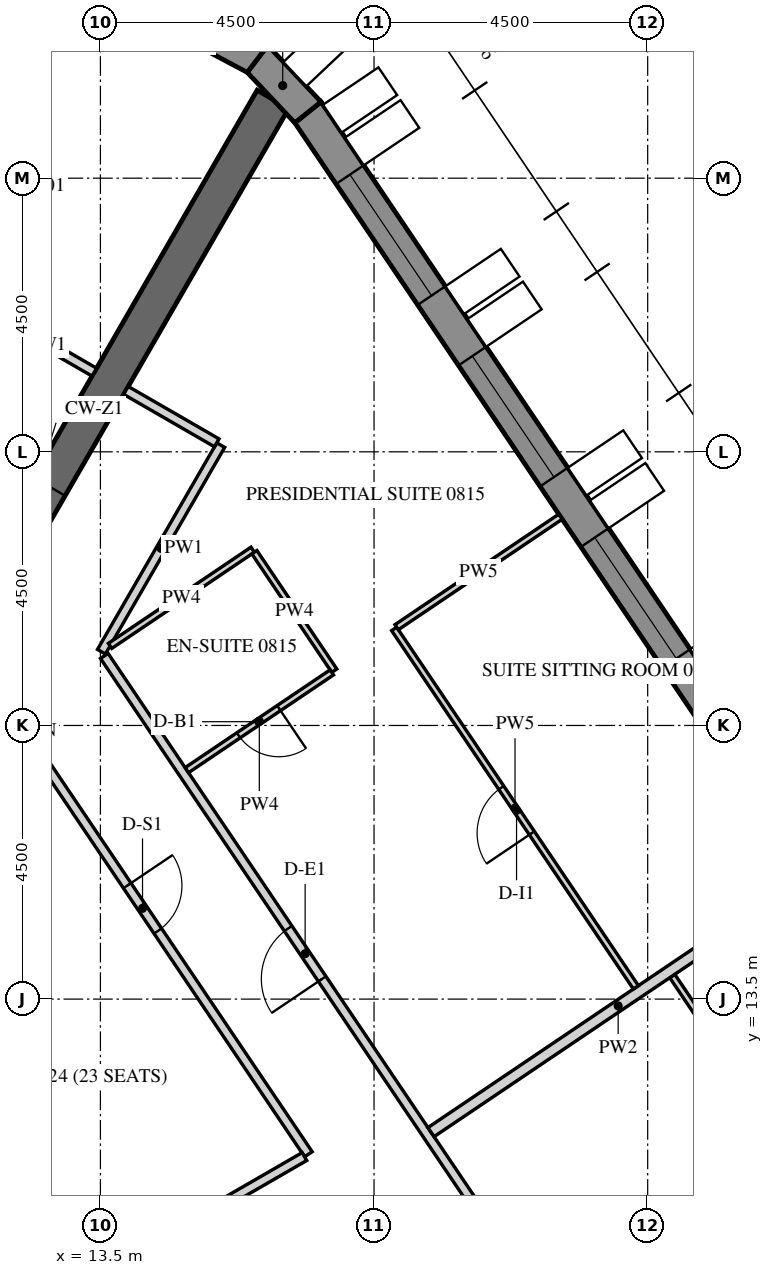
"""IFC4 building model, lengths in metres.
Left out: names, types, materials, properties, quantities, classifications, styles, units other than length and angle.
Written with IfcOpenShell. Run it as: python <this file> out.ifc"""

import sys

from ifc_helpers import new_model, si_unit, direction, frame, frame_2d, origin, place, context, subcontext, project, spatial, polyline, rectangle, outline, extrude, element, fill, save


model = new_model("IFC4")
c1 = context("Model", 3, precision=1e-05, world=origin(), true_north=direction((0.0, 1.0)))
c2 = subcontext(c1, "Body", "Model", "MODEL_VIEW")
j1 = project(units=[si_unit("LENGTHUNIT", "METRE"), si_unit("PLANEANGLEUNIT", "RADIAN")], contexts=[c1])
p1 = place(None, origin())
s1 = spatial("IfcSite", under=j1, at=p1, CompositionType="ELEMENT")
p2 = place(p1, origin())
s2 = spatial("IfcBuilding", under=s1, at=p2, CompositionType="ELEMENT")
p3 = place(p2, frame((0.0, 0.0, 111.6)))
s3 = spatial("IfcBuildingStorey", under=s2, at=p3, CompositionType="ELEMENT", Elevation=111.6)
p4 = place(p3, frame((33.728, 3.153, -0.15), z_axis=(0.0, 0.0, 1.0), x_axis=(-0.559192411416, 0.82903790445, 0.0)))
e1 = element("IfcWall", 1, at=p4, inside=s3, PredefinedType="SOLIDWALL", context=c2, shape_type="SweptSolid", body=[
    extrude(outline(polyline([(-0.026, -0.275), (30.093, -0.275), (30.048, 0.275), (0.026, 0.275), (-0.026, -0.275)])), origin(), (0.0, 0.0, 1.0), 3.9),
])
p5 = place(p4, frame((1.236, 0.0, 1.05)))
e2 = element("IfcOpeningElement", 2, at=p5, cuts=e1, PredefinedType="OPENING", context=c2, shape_type="SweptSolid", body=[
    extrude(rectangle(XDim=2.4, YDim=2.4, at=frame_2d((1.2, 1.2))), frame((0.0, 0.285, 0.0), z_axis=(0.0, -1.0, 0.0), x_axis=(1.0, 0.0, 0.0)), (0.0, 0.0, 1.0), 0.57),
])
p6 = place(p4, frame((4.835, 0.0, 1.05)))
e3 = element("IfcOpeningElement", 3, at=p6, cuts=e1, PredefinedType="OPENING", context=c2, shape_type="SweptSolid", body=[
    extrude(rectangle(XDim=2.4, YDim=2.4, at=frame_2d((1.2, 1.2))), frame((0.0, 0.285, 0.0), z_axis=(0.0, -1.0, 0.0), x_axis=(1.0, 0.0, 0.0)), (0.0, 0.0, 1.0), 0.57),
])
p7 = place(p4, frame((8.436, 0.0, 1.05)))
e4 = element("IfcOpeningElement", 4, at=p7, cuts=e1, PredefinedType="OPENING", context=c2, shape_type="SweptSolid", body=[
    extrude(rectangle(XDim=2.4, YDim=2.4, at=frame_2d((1.2, 1.2))), frame((0.0, 0.285, 0.0), z_axis=(0.0, -1.0, 0.0), x_axis=(1.0, 0.0, 0.0)), (0.0, 0.0, 1.0), 0.57),
])
p8 = place(p4, frame((12.035, 0.0, 1.05)))
e5 = element("IfcOpeningElement", 5, at=p8, cuts=e1, PredefinedType="OPENING", context=c2, shape_type="SweptSolid", body=[
    extrude(rectangle(XDim=2.4, YDim=2.4, at=frame_2d((1.2, 1.2))), frame((0.0, 0.285, 0.0), z_axis=(0.0, -1.0, 0.0), x_axis=(1.0, 0.0, 0.0)), (0.0, 0.0, 1.0), 0.57),
])
p9 = place(p4, frame((15.635, 0.0, 1.05)))
e6 = element("IfcOpeningElement", 6, at=p9, cuts=e1, PredefinedType="OPENING", context=c2, shape_type="SweptSolid", body=[
    extrude(rectangle(XDim=2.4, YDim=2.4, at=frame_2d((1.2, 1.2))), frame((0.0, 0.285, 0.0), z_axis=(0.0, -1.0, 0.0), x_axis=(1.0, 0.0, 0.0)), (0.0, 0.0, 1.0), 0.57),
])
p10 = place(p4, frame((19.236, 0.0, 1.05)))
e7 = element("IfcOpeningElement", 7, at=p10, cuts=e1, PredefinedType="OPENING", context=c2, shape_type="SweptSolid", body=[
    extrude(rectangle(XDim=2.4, YDim=2.4, at=frame_2d((1.2, 1.2))), frame((0.0, 0.285, 0.0), z_axis=(0.0, -1.0, 0.0), x_axis=(1.0, 0.0, 0.0)), (0.0, 0.0, 1.0), 0.57),
])
p11 = place(p4, frame((22.835, 0.0, 1.05)))
e8 = element("IfcOpeningElement", 8, at=p11, cuts=e1, PredefinedType="OPENING", context=c2, shape_type="SweptSolid", body=[
    extrude(rectangle(XDim=2.4, YDim=2.4, at=frame_2d((1.2, 1.2))), frame((0.0, 0.285, 0.0), z_axis=(0.0, -1.0, 0.0), x_axis=(1.0, 0.0, 0.0)), (0.0, 0.0, 1.0), 0.57),
])
p12 = place(p4, frame((26.436, 0.0, 1.05)))
e9 = element("IfcOpeningElement", 9, at=p12, cuts=e1, PredefinedType="OPENING", context=c2, shape_type="SweptSolid", body=[
    extrude(rectangle(XDim=2.4, YDim=2.4, at=frame_2d((1.2, 1.2))), frame((0.0, 0.285, 0.0), z_axis=(0.0, -1.0, 0.0), x_axis=(1.0, 0.0, 0.0)), (0.0, 0.0, 1.0), 0.57),
])
p13 = place(p3, frame((16.913, 28.083, -0.15), z_axis=(0.0, 0.0, 1.0), x_axis=(-0.686196220404, 0.727416488061, 0.0)))
e10 = element("IfcWall", 10, at=p13, inside=s3, PredefinedType="SOLIDWALL", context=c2, shape_type="SweptSolid", body=[
    extrude(outline(polyline([(-0.022, -0.275), (1.253, -0.275), (1.163, 0.275), (0.022, 0.275), (-0.022, -0.275)])), origin(), (0.0, 0.0, 1.0), 3.9),
])
p14 = place(p3, frame((16.083, 28.962, -0.15), z_axis=(0.0, 0.0, 1.0), x_axis=(-0.882995347911, 0.469381737574, 0.0)))
e11 = element("IfcWall", 11, at=p14, inside=s3, PredefinedType="SOLIDWALL", context=c2, shape_type="SweptSolid", body=[
    extrude(outline(polyline([(-0.045, -0.275), (1.253, -0.275), (1.163, 0.275), (0.045, 0.275), (-0.045, -0.275)])), origin(), (0.0, 0.0, 1.0), 3.9),
])
p15 = place(p3, frame((15.819, 0.0, -0.15), z_axis=(0.0, 0.0, 1.0), x_axis=(-0.499999880136, 0.866025472988, 0.0)))
e12 = element("IfcWall", 12, at=p15, inside=s3, PredefinedType="SHEAR", context=c2, shape_type="SweptSolid", body=[
    extrude(outline(polyline([(-0.173, -0.3), (15.993, -0.3), (15.646, 0.3), (0.173, 0.3), (-0.173, -0.3)])), origin(), (0.0, 0.0, 1.0), 3.9),
])
p16 = place(p15, frame((6.981, 0.0, 0.15)))
e13 = element("IfcOpeningElement", 13, at=p16, cuts=e12, PredefinedType="OPENING", context=c2, shape_type="SweptSolid", body=[
    extrude(rectangle(XDim=1.8, YDim=2.4, at=frame_2d((0.9, 1.2))), frame((0.0, 0.31, 0.0), z_axis=(0.0, -1.0, 0.0), x_axis=(1.0, 0.0, 0.0)), (0.0, 0.0, 1.0), 0.62),
])
p17 = place(p3, frame((8.083, 14.0, -0.15), z_axis=(0.0, 0.0, 1.0), x_axis=(0.499997680643, 0.866026742862, 0.0)))
e14 = element("IfcWall", 14, at=p17, inside=s3, PredefinedType="SHEAR", context=c2, shape_type="SweptSolid", body=[
    extrude(rectangle(XDim=16.509, YDim=0.6, at=frame_2d((8.254, 0.0))), origin(), (0.0, 0.0, 1.0), 3.9),
])
p18 = place(p17, frame((7.354, 0.0, 0.15)))
e15 = element("IfcOpeningElement", 15, at=p18, cuts=e14, PredefinedType="OPENING", context=c2, shape_type="SweptSolid", body=[
    extrude(rectangle(XDim=1.8, YDim=2.4, at=frame_2d((0.9, 1.2))), frame((0.0, 0.31, 0.0), z_axis=(0.0, -1.0, 0.0), x_axis=(1.0, 0.0, 0.0)), (0.0, 0.0, 1.0), 0.62),
])
p19 = place(p3, frame((13.4, 23.81, 0.0), z_axis=(0.0, 0.0, 1.0), x_axis=(-0.865989075817, 0.500062916607, 0.0)))
e16 = element("IfcWall", 16, at=p19, inside=s3, PredefinedType="PARTITIONING", context=c2, shape_type="SweptSolid", body=[
    extrude(rectangle(XDim=1.8, YDim=0.15, at=frame_2d((0.9, 0.0))), origin(), (0.0, 0.0, 1.0), 2.988),
])
p20 = place(p3, frame((25.821, 0.972, 0.0), z_axis=(0.0, 0.0, 1.0), x_axis=(-0.559192946342, 0.829037543638, 0.0)))
e17 = element("IfcWall", 17, at=p20, inside=s3, PredefinedType="PARTITIONING", context=c2, shape_type="SweptSolid", body=[
    extrude(rectangle(XDim=21.918, YDim=0.15, at=frame_2d((10.959, 0.0))), origin(), (0.0, 0.0, 1.0), 2.988),
])
p21 = place(p20, frame((6.969, 0.0, 0.0)))
e18 = element("IfcOpeningElement", 18, at=p21, cuts=e17, PredefinedType="OPENING", context=c2, shape_type="SweptSolid", body=[
    extrude(rectangle(XDim=1.0, YDim=2.1, at=frame_2d((0.5, 1.05))), frame((0.0, 0.085, 0.0), z_axis=(0.0, -1.0, 0.0), x_axis=(1.0, 0.0, 0.0)), (0.0, 0.0, 1.0), 0.17),
])
p22 = place(p20, frame((15.511, 0.0, 0.0)))
e19 = element("IfcOpeningElement", 19, at=p22, cuts=e17, PredefinedType="OPENING", context=c2, shape_type="SweptSolid", body=[
    extrude(rectangle(XDim=1.0, YDim=2.1, at=frame_2d((0.5, 1.05))), frame((0.0, 0.085, 0.0), z_axis=(0.0, -1.0, 0.0), x_axis=(1.0, 0.0, 0.0)), (0.0, 0.0, 1.0), 0.17),
])
p23 = place(p3, frame((13.517, 19.213, 0.0), z_axis=(0.0, 0.0, 1.0), x_axis=(0.499981033738, 0.866036353684, 0.0)))
e20 = element("IfcWall", 20, at=p23, inside=s3, PredefinedType="PARTITIONING", context=c2, shape_type="SweptSolid", body=[
    extrude(rectangle(XDim=3.923, YDim=0.15, at=frame_2d((1.961, 0.0))), origin(), (0.0, 0.0, 1.0), 2.988),
])
p24 = place(p3, frame((15.414, 22.648, 0.0), z_axis=(0.0, 0.0, 1.0), x_axis=(-0.866074815912, 0.499914405916, 0.0)))
e21 = element("IfcWall", 21, at=p24, inside=s3, PredefinedType="PARTITIONING", context=c2, shape_type="SweptSolid", body=[
    extrude(rectangle(XDim=1.725, YDim=0.15, at=frame_2d((0.862, 0.0))), origin(), (0.0, 0.0, 1.0), 2.988),
])
p25 = place(p3, frame((11.465, 19.037, 0.0), z_axis=(0.0, 0.0, 1.0), x_axis=(0.559196064773, -0.829035440221, 0.0)))
e22 = element("IfcWall", 22, at=p25, inside=s3, PredefinedType="PARTITIONING", context=c2, shape_type="SweptSolid", body=[
    extrude(rectangle(XDim=9.757, YDim=0.15, at=frame_2d((4.878, 0.0))), origin(), (0.0, 0.0, 1.0), 2.988),
])
p26 = place(p25, frame((4.428, 0.0, 0.0)))
e23 = element("IfcOpeningElement", 23, at=p26, cuts=e22, PredefinedType="OPENING", context=c2, shape_type="SweptSolid", body=[
    extrude(rectangle(XDim=0.9, YDim=2.1, at=frame_2d((0.45, 1.05))), frame((0.0, 0.085, 0.0), z_axis=(0.0, -1.0, 0.0), x_axis=(1.0, 0.0, 0.0)), (0.0, 0.0, 1.0), 0.17),
])
p27 = place(p3, frame((16.855, 10.911, 0.0), z_axis=(0.0, 0.0, 1.0), x_axis=(-0.866020343444, -0.500008764664, 0.0)))
e24 = element("IfcWall", 24, at=p27, inside=s3, PredefinedType="PARTITIONING", context=c2, shape_type="SweptSolid", body=[
    extrude(rectangle(XDim=6.053, YDim=0.15, at=frame_2d((3.026, 0.0))), origin(), (0.0, 0.0, 1.0), 2.988),
])
p28 = place(p3, frame((26.852, 8.027, 0.0), z_axis=(0.0, 0.0, 1.0), x_axis=(-0.559216845309, 0.829021423078, 0.0)))
e25 = element("IfcWall", 25, at=p28, inside=s3, PredefinedType="PARTITIONING", context=c2, shape_type="SweptSolid", body=[
    extrude(rectangle(XDim=7.06, YDim=0.1, at=frame_2d((3.53, 0.0))), origin(), (0.0, 0.0, 1.0), 2.988),
])
p29 = place(p28, frame((3.1, 0.0, 0.0)))
e26 = element("IfcOpeningElement", 26, at=p29, cuts=e25, PredefinedType="OPENING", context=c2, shape_type="SweptSolid", body=[
    extrude(rectangle(XDim=0.9, YDim=2.1, at=frame_2d((0.45, 1.05))), frame((0.0, 0.06, 0.0), z_axis=(0.0, -1.0, 0.0), x_axis=(1.0, 0.0, 0.0)), (0.0, 0.0, 1.0), 0.12),
])
p30 = place(p3, frame((25.092, 15.464, 0.0), z_axis=(0.0, 0.0, 1.0), x_axis=(-0.829043414408, -0.559184242471, 0.0)))
e27 = element("IfcWall", 27, at=p30, inside=s3, PredefinedType="PARTITIONING", context=c2, shape_type="SweptSolid", body=[
    extrude(rectangle(XDim=7.425, YDim=0.18, at=frame_2d((3.712, 0.0))), origin(), (0.0, 0.0, 1.0), 2.988),
])
p31 = place(p3, frame((13.659, 19.308, 0.0), z_axis=(0.0, 0.0, 1.0), x_axis=(0.829010718334, 0.559232714429, 0.0)))
e28 = element("IfcWall", 28, at=p31, inside=s3, PredefinedType="PARTITIONING", context=c2, shape_type="SweptSolid", body=[
    extrude(rectangle(XDim=2.829, YDim=0.1, at=frame_2d((1.415, 0.0))), origin(), (0.0, 0.0, 1.0), 2.988),
])
p32 = place(p3, frame((16.032, 20.849, 0.0), z_axis=(0.0, 0.0, 1.0), x_axis=(0.559151632687, -0.829065408555, 0.0)))
e29 = element("IfcWall", 29, at=p32, inside=s3, PredefinedType="PARTITIONING", context=c2, shape_type="SweptSolid", body=[
    extrude(rectangle(XDim=2.35, YDim=0.1, at=frame_2d((1.175, 0.0))), origin(), (0.0, 0.0, 1.0), 2.988),
])
p33 = place(p3, frame((17.305, 18.873, 0.0), z_axis=(0.0, 0.0, 1.0), x_axis=(-0.82904649496, -0.559179675234, 0.0)))
e30 = element("IfcWall", 30, at=p33, inside=s3, PredefinedType="PARTITIONING", context=c2, shape_type="SweptSolid", body=[
    extrude(rectangle(XDim=2.875, YDim=0.1, at=frame_2d((1.438, 0.0))), origin(), (0.0, 0.0, 1.0), 2.988),
])
p34 = place(p33, frame((1.05, 0.0, 0.0)))
e31 = element("IfcOpeningElement", 31, at=p34, cuts=e30, PredefinedType="OPENING", context=c2, shape_type="SweptSolid", body=[
    extrude(rectangle(XDim=0.8, YDim=2.1, at=frame_2d((0.4, 1.05))), frame((0.0, 0.06, 0.0), z_axis=(0.0, -1.0, 0.0), x_axis=(1.0, 0.0, 0.0)), (0.0, 0.0, 1.0), 0.12),
])
p35 = place(p3, frame((22.306, 13.693, 0.0), z_axis=(0.0, 0.0, 1.0), x_axis=(-0.559185029686, 0.829042883435, 0.0)))
e32 = element("IfcWall", 32, at=p35, inside=s3, PredefinedType="PARTITIONING", context=c2, shape_type="SweptSolid", body=[
    extrude(rectangle(XDim=7.11, YDim=0.1, at=frame_2d((3.555, 0.0))), origin(), (0.0, 0.0, 1.0), 2.988),
])
p36 = place(p35, frame((3.06, 0.0, 0.0)))
e33 = element("IfcOpeningElement", 33, at=p36, cuts=e32, PredefinedType="OPENING", context=c2, shape_type="SweptSolid", body=[
    extrude(rectangle(XDim=0.9, YDim=2.1, at=frame_2d((0.45, 1.05))), frame((0.0, 0.06, 0.0), z_axis=(0.0, -1.0, 0.0), x_axis=(1.0, 0.0, 0.0)), (0.0, 0.0, 1.0), 0.12),
])
p37 = place(p3, frame((18.372, 19.616, 0.0), z_axis=(0.0, 0.0, 1.0), x_axis=(0.829033253898, 0.55919930609, 0.0)))
e34 = element("IfcWall", 34, at=p37, inside=s3, PredefinedType="PARTITIONING", context=c2, shape_type="SweptSolid", body=[
    extrude(rectangle(XDim=3.25, YDim=0.1, at=frame_2d((1.625, 0.0))), origin(), (0.0, 0.0, 1.0), 2.988),
])
p38 = place(p10, frame((0.0, 0.205, 0.0)))
e35 = element("IfcWindow", 35, at=p38, inside=s3, PartitioningType="DOUBLE_PANEL_VERTICAL", PredefinedType="WINDOW", context=c2, shape_type="SweptSolid", body=[
    extrude(rectangle(XDim=2.4, YDim=2.4, at=frame_2d((1.2, 1.2))), frame((0.0, 0.03, 0.0), z_axis=(0.0, -1.0, 0.0), x_axis=(1.0, 0.0, 0.0)), (0.0, 0.0, 1.0), 0.06),
])
fill(e7, e35)
p39 = place(p11, frame((0.0, 0.205, 0.0)))
e36 = element("IfcWindow", 36, at=p39, inside=s3, PartitioningType="DOUBLE_PANEL_VERTICAL", PredefinedType="WINDOW", context=c2, shape_type="SweptSolid", body=[
    extrude(rectangle(XDim=2.4, YDim=2.4, at=frame_2d((1.2, 1.2))), frame((0.0, 0.03, 0.0), z_axis=(0.0, -1.0, 0.0), x_axis=(1.0, 0.0, 0.0)), (0.0, 0.0, 1.0), 0.06),
])
fill(e8, e36)
p40 = place(p12, frame((0.0, 0.205, 0.0)))
e37 = element("IfcWindow", 37, at=p40, inside=s3, PartitioningType="DOUBLE_PANEL_VERTICAL", PredefinedType="WINDOW", context=c2, shape_type="SweptSolid", body=[
    extrude(rectangle(XDim=2.4, YDim=2.4, at=frame_2d((1.2, 1.2))), frame((0.0, 0.03, 0.0), z_axis=(0.0, -1.0, 0.0), x_axis=(1.0, 0.0, 0.0)), (0.0, 0.0, 1.0), 0.06),
])
fill(e9, e37)
p41 = place(p22, origin())
e38 = element("IfcDoor", 38, at=p41, inside=s3, OperationType="SINGLE_SWING_LEFT", PredefinedType="DOOR", context=c2, shape_type="SweptSolid", body=[
    extrude(rectangle(XDim=1.0, YDim=2.1, at=frame_2d((0.5, 1.05))), frame((0.0, 0.025, 0.0), z_axis=(0.0, -1.0, 0.0), x_axis=(1.0, 0.0, 0.0)), (0.0, 0.0, 1.0), 0.05),
])
fill(e19, e38)
p42 = place(p34, origin())
e39 = element("IfcDoor", 39, at=p42, inside=s3, OperationType="SINGLE_SWING_LEFT", PredefinedType="DOOR", context=c2, shape_type="SweptSolid", body=[
    extrude(rectangle(XDim=0.8, YDim=2.1, at=frame_2d((0.4, 1.05))), frame((0.0, 0.025, 0.0), z_axis=(0.0, -1.0, 0.0), x_axis=(1.0, 0.0, 0.0)), (0.0, 0.0, 1.0), 0.05),
])
fill(e31, e39)
p43 = place(p36, origin())
e40 = element("IfcDoor", 40, at=p43, inside=s3, OperationType="SINGLE_SWING_RIGHT", PredefinedType="DOOR", context=c2, shape_type="SweptSolid", body=[
    extrude(rectangle(XDim=0.9, YDim=2.1, at=frame_2d((0.45, 1.05))), frame((0.0, 0.025, 0.0), z_axis=(0.0, -1.0, 0.0), x_axis=(1.0, 0.0, 0.0)), (0.0, 0.0, 1.0), 0.05),
])
fill(e33, e40)
p44 = place(p26, origin())
e41 = element("IfcDoor", 41, at=p44, inside=s3, OperationType="SINGLE_SWING_RIGHT", PredefinedType="DOOR", context=c2, shape_type="SweptSolid", body=[
    extrude(rectangle(XDim=0.9, YDim=2.1, at=frame_2d((0.45, 1.05))), frame((0.0, 0.025, 0.0), z_axis=(0.0, -1.0, 0.0), x_axis=(1.0, 0.0, 0.0)), (0.0, 0.0, 1.0), 0.05),
])
fill(e23, e41)
save(model, sys.argv[1])
